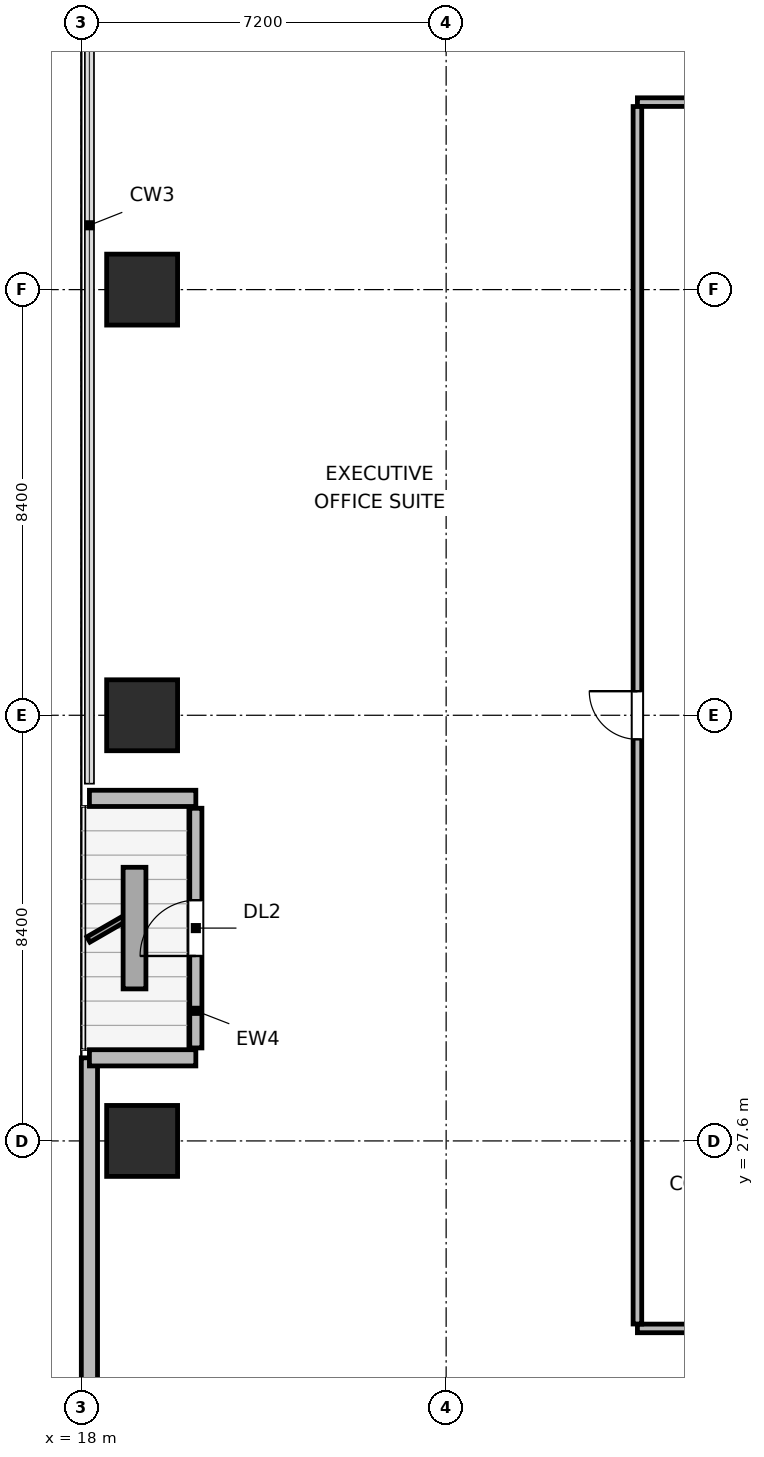
"""IFC4 building model, lengths in metres.
Left out: names, types, materials, properties, quantities, classifications, styles, units other than length and angle.
Written with IfcOpenShell. Run it as: python <this file> out.ifc"""

import sys

from ifc_helpers import new_model, si_unit, direction, frame, frame_2d, origin, origin_2d, place, context, subcontext, project, spatial, rectangle, extrude, element, fill, save


model = new_model("IFC4")
c1 = context("Model", 3, precision=1e-05, world=origin(), true_north=direction((0.0, 1.0)))
c2 = subcontext(c1, "Body", "Model", "MODEL_VIEW")
j1 = project(units=[si_unit("LENGTHUNIT", "METRE"), si_unit("PLANEANGLEUNIT", "RADIAN")], contexts=[c1])
p1 = place(None, origin())
s1 = spatial("IfcSite", under=j1, at=p1, CompositionType="ELEMENT")
p2 = place(p1, origin())
s2 = spatial("IfcBuilding", under=s1, at=p2, CompositionType="ELEMENT")
p3 = place(p2, frame((0.0, 0.0, 105.3)))
s3 = spatial("IfcBuildingStorey", under=s2, at=p3, CompositionType="ELEMENT", Elevation=105.3)
for number, where, z_axis, x_axis in (
    (1, (19.2, 27.6, 0.0), (0.0, 0.0, 1.0), (1.0, 0.0, 0.0)),
    (2, (19.2, 36.0, 0.0), (0.0, 0.0, 1.0), (1.0, 0.0, 0.0)),
    (3, (19.2, 44.4, 0.0), (0.0, 0.0, 1.0), (1.0, 0.0, 0.0)),
):
    element("IfcColumn", number, at=place(p3, frame(where, z_axis=z_axis, x_axis=x_axis)), inside=s3, PredefinedType="COLUMN", context=c2, shape_type="SweptSolid", body=[
        extrude(rectangle(XDim=1.4, YDim=1.4, at=origin_2d()), origin(), (0.0, 0.0, 1.0), 3.9),
    ])
p4 = place(p3, frame((18.16, 15.021, 0.0), z_axis=(0.0, 0.0, 1.0), x_axis=(0.0, 1.0, 0.0)))
e4 = element("IfcWall", 4, at=p4, inside=s3, PredefinedType="SOLIDWALL", context=c2, shape_type="SweptSolid", body=[
    extrude(rectangle(XDim=14.219, YDim=0.32, at=frame_2d((7.109, 0.0))), origin(), (0.0, 0.0, 1.0), 3.64),
])
p5 = place(p3, frame((18.16, 29.24, 0.0), z_axis=(0.0, 0.0, 1.0), x_axis=(1.0, 0.0, 0.0)))
e5 = element("IfcWall", 5, at=p5, inside=s3, PredefinedType="SOLIDWALL", context=c2, shape_type="SweptSolid", body=[
    extrude(rectangle(XDim=2.1, YDim=0.32, at=frame_2d((1.05, 0.0))), origin(), (0.0, 0.0, 1.0), 2.875),
])
p6 = place(p3, frame((20.26, 29.435, 0.0), z_axis=(0.0, 0.0, 1.0), x_axis=(0.0, 1.0, 0.0)))
e6 = element("IfcWall", 6, at=p6, inside=s3, PredefinedType="SOLIDWALL", context=c2, shape_type="SweptSolid", body=[
    extrude(rectangle(XDim=4.73, YDim=0.24, at=frame_2d((2.365, 0.0))), origin(), (0.0, 0.0, 1.0), 3.162),
])
p7 = place(p6, frame((1.815, 0.0, 0.0)))
e7 = element("IfcOpeningElement", 7, at=p7, cuts=e6, PredefinedType="OPENING", context=c2, shape_type="SweptSolid", body=[
    extrude(rectangle(XDim=1.1, YDim=2.04, at=frame_2d((0.55, 1.02))), frame((0.0, 0.13, 0.0), z_axis=(0.0, -1.0, 0.0), x_axis=(1.0, 0.0, 0.0)), (0.0, 0.0, 1.0), 0.26),
])
p8 = place(p3, frame((20.26, 34.36, 0.0), z_axis=(0.0, 0.0, 1.0), x_axis=(-1.0, 0.0, 0.0)))
e8 = element("IfcWall", 8, at=p8, inside=s3, PredefinedType="SOLIDWALL", context=c2, shape_type="SweptSolid", body=[
    extrude(rectangle(XDim=2.1, YDim=0.32, at=frame_2d((1.05, 0.0))), origin(), (0.0, 0.0, 1.0), 2.875),
])
p9 = place(p3, frame((28.975, 23.9, 0.0), z_axis=(0.0, 0.0, 1.0), x_axis=(1.0, 0.0, 0.0)))
e9 = element("IfcWall", 9, at=p9, inside=s3, PredefinedType="PARTITIONING", context=c2, shape_type="SweptSolid", body=[
    extrude(rectangle(XDim=38.05, YDim=0.17, at=frame_2d((19.025, 0.0))), origin(), (0.0, 0.0, 1.0), 3.64),
])
p10 = place(p9, frame((3.097, 0.0, 0.0)))
e10 = element("IfcOpeningElement", 10, at=p10, cuts=e9, PredefinedType="OPENING", context=c2, shape_type="SweptSolid", body=[
    extrude(rectangle(XDim=0.95, YDim=2.04, at=frame_2d((0.475, 1.02))), frame((0.0, 0.095, 0.0), z_axis=(0.0, -1.0, 0.0), x_axis=(1.0, 0.0, 0.0)), (0.0, 0.0, 1.0), 0.19),
])
p11 = place(p9, frame((9.64, 0.0, 0.0)))
e11 = element("IfcOpeningElement", 11, at=p11, cuts=e9, PredefinedType="OPENING", context=c2, shape_type="SweptSolid", body=[
    extrude(rectangle(XDim=0.95, YDim=2.04, at=frame_2d((0.475, 1.02))), frame((0.0, 0.095, 0.0), z_axis=(0.0, -1.0, 0.0), x_axis=(1.0, 0.0, 0.0)), (0.0, 0.0, 1.0), 0.19),
])
p12 = place(p9, frame((15.58, 0.0, 0.0)))
e12 = element("IfcOpeningElement", 12, at=p12, cuts=e9, PredefinedType="OPENING", context=c2, shape_type="SweptSolid", body=[
    extrude(rectangle(XDim=0.95, YDim=2.04, at=frame_2d((0.475, 1.02))), frame((0.0, 0.095, 0.0), z_axis=(0.0, -1.0, 0.0), x_axis=(1.0, 0.0, 0.0)), (0.0, 0.0, 1.0), 0.19),
])
p13 = place(p9, frame((21.52, 0.0, 0.0)))
e13 = element("IfcOpeningElement", 13, at=p13, cuts=e9, PredefinedType="OPENING", context=c2, shape_type="SweptSolid", body=[
    extrude(rectangle(XDim=0.95, YDim=2.04, at=frame_2d((0.475, 1.02))), frame((0.0, 0.095, 0.0), z_axis=(0.0, -1.0, 0.0), x_axis=(1.0, 0.0, 0.0)), (0.0, 0.0, 1.0), 0.19),
])
p14 = place(p9, frame((27.46, 0.0, 0.0)))
e14 = element("IfcOpeningElement", 14, at=p14, cuts=e9, PredefinedType="OPENING", context=c2, shape_type="SweptSolid", body=[
    extrude(rectangle(XDim=0.95, YDim=2.04, at=frame_2d((0.475, 1.02))), frame((0.0, 0.095, 0.0), z_axis=(0.0, -1.0, 0.0), x_axis=(1.0, 0.0, 0.0)), (0.0, 0.0, 1.0), 0.19),
])
p15 = place(p9, frame((34.003, 0.0, 0.0)))
e15 = element("IfcOpeningElement", 15, at=p15, cuts=e9, PredefinedType="OPENING", context=c2, shape_type="SweptSolid", body=[
    extrude(rectangle(XDim=0.95, YDim=2.04, at=frame_2d((0.475, 1.02))), frame((0.0, 0.095, 0.0), z_axis=(0.0, -1.0, 0.0), x_axis=(1.0, 0.0, 0.0)), (0.0, 0.0, 1.0), 0.19),
])
p16 = place(p3, frame((28.975, 48.1, 0.0), z_axis=(0.0, 0.0, 1.0), x_axis=(1.0, 0.0, 0.0)))
e16 = element("IfcWall", 16, at=p16, inside=s3, PredefinedType="PARTITIONING", context=c2, shape_type="SweptSolid", body=[
    extrude(rectangle(XDim=38.05, YDim=0.17, at=frame_2d((19.025, 0.0))), origin(), (0.0, 0.0, 1.0), 3.64),
])
p17 = place(p16, frame((4.923, 0.0, 0.0)))
e17 = element("IfcOpeningElement", 17, at=p17, cuts=e16, PredefinedType="OPENING", context=c2, shape_type="SweptSolid", body=[
    extrude(rectangle(XDim=0.95, YDim=2.04, at=frame_2d((0.475, 1.02))), frame((0.0, 0.095, 0.0), z_axis=(0.0, -1.0, 0.0), x_axis=(1.0, 0.0, 0.0)), (0.0, 0.0, 1.0), 0.19),
])
p18 = place(p16, frame((13.34, 0.0, 0.0)))
e18 = element("IfcOpeningElement", 18, at=p18, cuts=e16, PredefinedType="OPENING", context=c2, shape_type="SweptSolid", body=[
    extrude(rectangle(XDim=0.95, YDim=2.04, at=frame_2d((0.475, 1.02))), frame((0.0, 0.095, 0.0), z_axis=(0.0, -1.0, 0.0), x_axis=(1.0, 0.0, 0.0)), (0.0, 0.0, 1.0), 0.19),
])
p19 = place(p16, frame((20.06, 0.0, 0.0)))
e19 = element("IfcOpeningElement", 19, at=p19, cuts=e16, PredefinedType="OPENING", context=c2, shape_type="SweptSolid", body=[
    extrude(rectangle(XDim=0.95, YDim=2.04, at=frame_2d((0.475, 1.02))), frame((0.0, 0.095, 0.0), z_axis=(0.0, -1.0, 0.0), x_axis=(1.0, 0.0, 0.0)), (0.0, 0.0, 1.0), 0.19),
])
p20 = place(p16, frame((25.27, 0.0, 0.0)))
e20 = element("IfcOpeningElement", 20, at=p20, cuts=e16, PredefinedType="OPENING", context=c2, shape_type="SweptSolid", body=[
    extrude(rectangle(XDim=0.95, YDim=2.04, at=frame_2d((0.475, 1.02))), frame((0.0, 0.095, 0.0), z_axis=(0.0, -1.0, 0.0), x_axis=(1.0, 0.0, 0.0)), (0.0, 0.0, 1.0), 0.19),
])
p21 = place(p16, frame((32.178, 0.0, 0.0)))
e21 = element("IfcOpeningElement", 21, at=p21, cuts=e16, PredefinedType="OPENING", context=c2, shape_type="SweptSolid", body=[
    extrude(rectangle(XDim=0.95, YDim=2.04, at=frame_2d((0.475, 1.02))), frame((0.0, 0.095, 0.0), z_axis=(0.0, -1.0, 0.0), x_axis=(1.0, 0.0, 0.0)), (0.0, 0.0, 1.0), 0.19),
])
p22 = place(p3, frame((28.975, 23.987, 0.0), z_axis=(0.0, 0.0, 1.0), x_axis=(0.0, 1.0, 0.0)))
e22 = element("IfcWall", 22, at=p22, inside=s3, PredefinedType="PARTITIONING", context=c2, shape_type="SweptSolid", body=[
    extrude(rectangle(XDim=24.026, YDim=0.17, at=frame_2d((12.013, 0.0))), origin(), (0.0, 0.0, 1.0), 3.64),
])
p23 = place(p22, frame((11.538, 0.0, 0.0)))
e23 = element("IfcOpeningElement", 23, at=p23, cuts=e22, PredefinedType="OPENING", context=c2, shape_type="SweptSolid", body=[
    extrude(rectangle(XDim=0.95, YDim=2.04, at=frame_2d((0.475, 1.02))), frame((0.0, 0.095, 0.0), z_axis=(0.0, -1.0, 0.0), x_axis=(1.0, 0.0, 0.0)), (0.0, 0.0, 1.0), 0.19),
])
p24 = place(p7, origin())
e24 = element("IfcDoor", 24, at=p24, inside=s3, OperationType="SINGLE_SWING_LEFT", PredefinedType="DOOR", context=c2, shape_type="SweptSolid", body=[
    extrude(rectangle(XDim=1.1, YDim=2.04, at=frame_2d((0.55, 1.02))), frame((0.0, 0.025, 0.0), z_axis=(0.0, -1.0, 0.0), x_axis=(1.0, 0.0, 0.0)), (0.0, 0.0, 1.0), 0.05),
])
fill(e7, e24)
p25 = place(p23, origin())
e25 = element("IfcDoor", 25, at=p25, inside=s3, OperationType="SINGLE_SWING_RIGHT", PredefinedType="DOOR", context=c2, shape_type="SweptSolid", body=[
    extrude(rectangle(XDim=0.95, YDim=2.04, at=frame_2d((0.475, 1.02))), frame((0.0, 0.025, 0.0), z_axis=(0.0, -1.0, 0.0), x_axis=(1.0, 0.0, 0.0)), (0.0, 0.0, 1.0), 0.05),
])
fill(e23, e25)
save(model, sys.argv[1])
